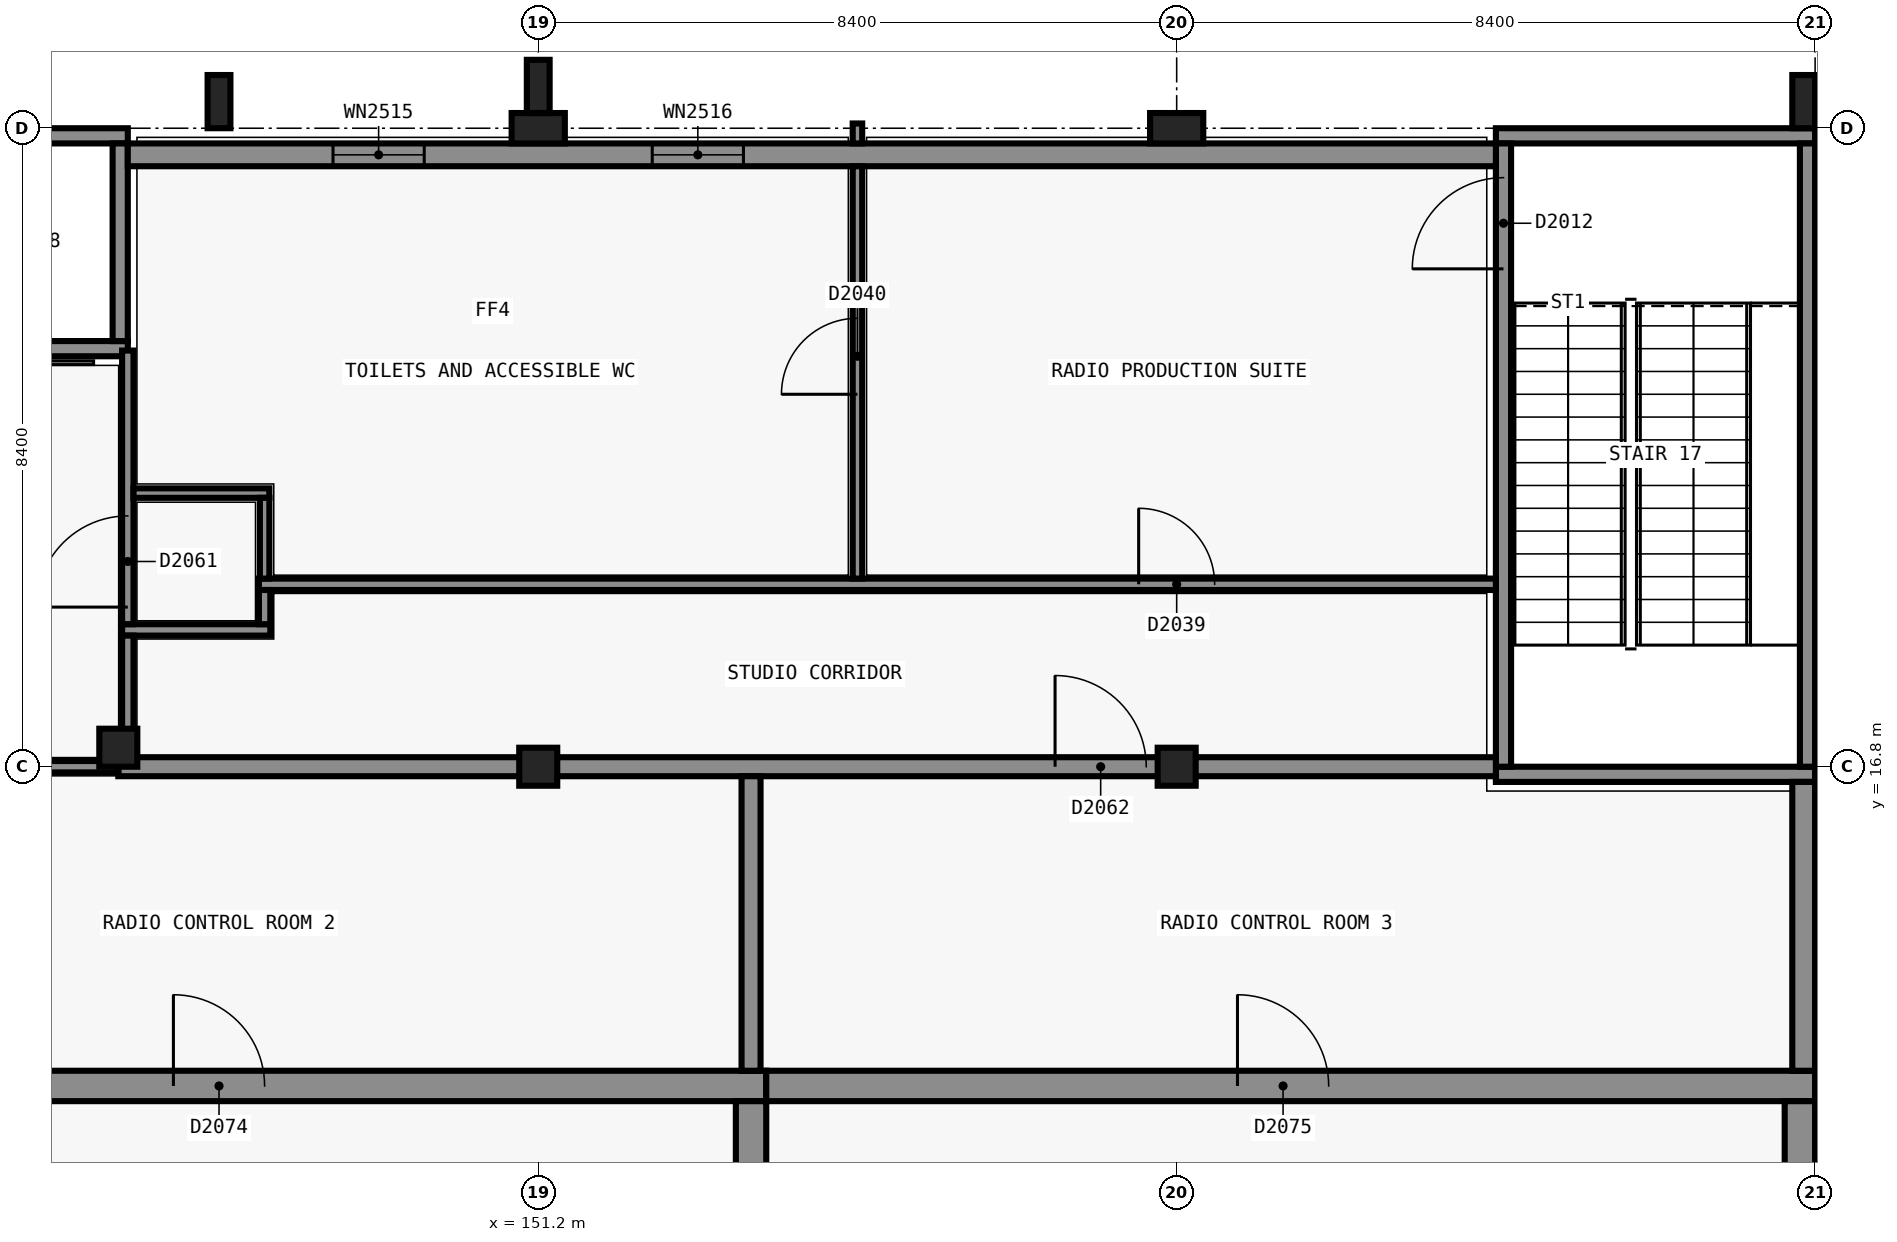
"""IFC4 building model, lengths in metres.
Left out: names, types, materials, properties, quantities, classifications, styles, units other than length and angle.
Written with IfcOpenShell. Run it as: python <this file> out.ifc"""

import sys

from ifc_helpers import new_model, si_unit, direction, frame, frame_2d, origin, origin_2d, place, context, subcontext, project, spatial, rectangle, extrude, element, fill, save


model = new_model("IFC4")
c1 = context("Model", 3, precision=1e-05, world=origin(), true_north=direction((0.0, 1.0)))
c2 = subcontext(c1, "Body", "Model", "MODEL_VIEW")
j1 = project(units=[si_unit("LENGTHUNIT", "METRE"), si_unit("PLANEANGLEUNIT", "RADIAN")], contexts=[c1])
p1 = place(None, origin())
s1 = spatial("IfcSite", under=j1, at=p1, CompositionType="ELEMENT")
p2 = place(p1, origin())
s2 = spatial("IfcBuilding", under=s1, at=p2, CompositionType="ELEMENT")
p3 = place(p2, frame((0.0, 0.0, 10.2)))
s3 = spatial("IfcBuildingStorey", under=s2, at=p3, CompositionType="ELEMENT", Elevation=10.2)
for number, where, z_axis, x_axis in (
    (1, (168.0, 16.7, 0.0), (0.0, 0.0, 1.0), (-1.0, 0.0, 0.0)),
    (2, (163.8, 25.1, 0.0), (0.0, 0.0, 1.0), (1.0, 0.0, 0.0)),
):
    element("IfcWall", number, at=place(p3, frame(where, z_axis=z_axis, x_axis=x_axis)), inside=s3, PredefinedType="SHEAR", context=c2, shape_type="SweptSolid", body=[
        extrude(rectangle(XDim=4.199, YDim=0.2, at=frame_2d((2.1, 0.0))), origin(), (0.0, 0.0, 1.0), 4.8),
    ])
p4 = place(p3, frame((163.9, 16.8, 0.0), z_axis=(0.0, 0.0, 1.0), x_axis=(0.0, 1.0, 0.0)))
e3 = element("IfcWall", 3, at=p4, inside=s3, PredefinedType="SHEAR", context=c2, shape_type="SweptSolid", body=[
    extrude(rectangle(XDim=8.2, YDim=0.2, at=frame_2d((4.1, 0.0))), origin(), (0.0, 0.0, 1.0), 4.8),
])
p5 = place(p4, frame((6.55, 0.0, 0.0)))
e4 = element("IfcOpeningElement", 4, at=p5, cuts=e3, PredefinedType="OPENING", context=c2, shape_type="SweptSolid", body=[
    extrude(rectangle(XDim=1.2, YDim=2.1, at=frame_2d((0.6, 1.05))), frame((0.0, 0.11, 0.0), z_axis=(0.0, -1.0, 0.0), x_axis=(1.0, 0.0, 0.0)), (0.0, 0.0, 1.0), 0.22),
])
p6 = place(p3, frame((167.9, 25.0, 0.0), z_axis=(0.0, 0.0, 1.0), x_axis=(0.0, -1.0, 0.0)))
e5 = element("IfcWall", 5, at=p6, inside=s3, PredefinedType="SHEAR", context=c2, shape_type="SweptSolid", body=[
    extrude(rectangle(XDim=8.2, YDim=0.2, at=frame_2d((4.1, 0.0))), origin(), (0.0, 0.0, 1.0), 4.8),
])
p7 = place(p3, frame((145.8, 22.3, 0.0), z_axis=(0.0, 0.0, 1.0), x_axis=(-1.0, 0.0, 0.0)))
e6 = element("IfcWall", 6, at=p7, inside=s3, PredefinedType="SHEAR", context=c2, shape_type="SweptSolid", body=[
    extrude(rectangle(XDim=4.2, YDim=0.2, at=frame_2d((2.1, 0.0))), origin(), (0.0, 0.0, 1.0), 4.8),
])
p8 = place(p7, frame((1.55, 0.0, 0.0)))
e7 = element("IfcOpeningElement", 7, at=p8, cuts=e6, PredefinedType="OPENING", context=c2, shape_type="SweptSolid", body=[
    extrude(rectangle(XDim=1.1, YDim=2.1, at=frame_2d((0.55, 1.05))), frame((0.0, 0.11, 0.0), z_axis=(0.0, -1.0, 0.0), x_axis=(1.0, 0.0, 0.0)), (0.0, 0.0, 1.0), 0.22),
])
p9 = place(p3, frame((141.6, 25.1, 0.0), z_axis=(0.0, 0.0, 1.0), x_axis=(1.0, 0.0, 0.0)))
e8 = element("IfcWall", 8, at=p9, inside=s3, PredefinedType="SHEAR", context=c2, shape_type="SweptSolid", body=[
    extrude(rectangle(XDim=4.2, YDim=0.2, at=frame_2d((2.1, 0.0))), origin(), (0.0, 0.0, 1.0), 4.8),
])
p10 = place(p3, frame((145.7, 25.0, 0.0), z_axis=(0.0, 0.0, 1.0), x_axis=(0.0, -1.0, 0.0)))
e9 = element("IfcWall", 9, at=p10, inside=s3, PredefinedType="SHEAR", context=c2, shape_type="SweptSolid", body=[
    extrude(rectangle(XDim=2.6, YDim=0.2, at=frame_2d((1.3, 0.0))), origin(), (0.0, 0.0, 1.0), 4.8),
])
p11 = place(p3, frame((140.2, 12.6, 0.0), z_axis=(0.0, 0.0, 1.0), x_axis=(1.0, 0.0, 0.0)))
e10 = element("IfcWall", 10, at=p11, inside=s3, PredefinedType="SHEAR", context=c2, shape_type="SweptSolid", body=[
    extrude(rectangle(XDim=14.0, YDim=0.4, at=frame_2d((7.0, 0.0))), origin(), (0.0, 0.0, 1.0), 4.8),
])
p12 = place(p11, frame((6.2, 0.0, 0.0)))
e11 = element("IfcOpeningElement", 11, at=p12, cuts=e10, PredefinedType="OPENING", context=c2, shape_type="SweptSolid", body=[
    extrude(rectangle(XDim=1.2, YDim=2.1, at=frame_2d((0.6, 1.05))), frame((0.0, 0.21, 0.0), z_axis=(0.0, -1.0, 0.0), x_axis=(1.0, 0.0, 0.0)), (0.0, 0.0, 1.0), 0.42),
])
p13 = place(p3, frame((154.0, 12.4, 0.0), z_axis=(0.0, 0.0, 1.0), x_axis=(0.0, -1.0, 0.0)))
e12 = element("IfcWall", 12, at=p13, inside=s3, PredefinedType="SHEAR", context=c2, shape_type="SweptSolid", body=[
    extrude(rectangle(XDim=12.0, YDim=0.4, at=frame_2d((6.0, 0.0))), origin(), (0.0, 0.0, 1.0), 4.8),
])
p14 = place(p3, frame((154.2, 12.6, 0.0), z_axis=(0.0, 0.0, 1.0), x_axis=(1.0, 0.0, 0.0)))
e13 = element("IfcWall", 13, at=p14, inside=s3, PredefinedType="SHEAR", context=c2, shape_type="SweptSolid", body=[
    extrude(rectangle(XDim=13.8, YDim=0.4, at=frame_2d((6.9, 0.0))), origin(), (0.0, 0.0, 1.0), 4.8),
])
p15 = place(p14, frame((6.2, 0.0, 0.0)))
e14 = element("IfcOpeningElement", 14, at=p15, cuts=e13, PredefinedType="OPENING", context=c2, shape_type="SweptSolid", body=[
    extrude(rectangle(XDim=1.2, YDim=2.1, at=frame_2d((0.6, 1.05))), frame((0.0, 0.21, 0.0), z_axis=(0.0, -1.0, 0.0), x_axis=(1.0, 0.0, 0.0)), (0.0, 0.0, 1.0), 0.42),
])
p16 = place(p3, frame((167.8, 12.4, 0.0), z_axis=(0.0, 0.0, 1.0), x_axis=(0.0, -1.0, 0.0)))
e15 = element("IfcWall", 15, at=p16, inside=s3, PredefinedType="SHEAR", context=c2, shape_type="SweptSolid", body=[
    extrude(rectangle(XDim=12.0, YDim=0.4, at=frame_2d((6.0, 0.0))), origin(), (0.0, 0.0, 1.0), 4.8),
])
p17 = place(p3, frame((167.85, 16.6, 0.0), z_axis=(0.0, 0.0, 1.0), x_axis=(0.0, -1.0, 0.0)))
e16 = element("IfcWall", 16, at=p17, inside=s3, PredefinedType="SOLIDWALL", context=c2, shape_type="SweptSolid", body=[
    extrude(rectangle(XDim=3.8, YDim=0.3, at=frame_2d((1.9, 0.0))), origin(), (0.0, 0.0, 1.0), 4.8),
])
p18 = place(p3, frame((151.2, 16.8, 0.0), z_axis=(0.0, 0.0, 1.0), x_axis=(1.0, 0.0, 0.0)))
e17 = element("IfcColumn", 17, at=p18, inside=s3, PredefinedType="COLUMN", context=c2, shape_type="SweptSolid", body=[
    extrude(rectangle(XDim=0.5, YDim=0.5, at=origin_2d()), origin(), (0.0, 0.0, 1.0), 4.8),
])
p19 = place(p3, frame((151.2, 25.2, 0.0), z_axis=(0.0, 0.0, 1.0), x_axis=(1.0, 0.0, 0.0)))
e18 = element("IfcColumn", 18, at=p19, inside=s3, PredefinedType="COLUMN", context=c2, shape_type="SweptSolid", body=[
    extrude(rectangle(XDim=0.7, YDim=0.4, at=origin_2d()), origin(), (0.0, 0.0, 1.0), 4.8),
])
p20 = place(p3, frame((159.6, 16.8, 0.0), z_axis=(0.0, 0.0, 1.0), x_axis=(1.0, 0.0, 0.0)))
e19 = element("IfcColumn", 19, at=p20, inside=s3, PredefinedType="COLUMN", context=c2, shape_type="SweptSolid", body=[
    extrude(rectangle(XDim=0.5, YDim=0.5, at=origin_2d()), origin(), (0.0, 0.0, 1.0), 4.8),
])
p21 = place(p3, frame((159.6, 25.2, 0.0), z_axis=(0.0, 0.0, 1.0), x_axis=(1.0, 0.0, 0.0)))
e20 = element("IfcColumn", 20, at=p21, inside=s3, PredefinedType="COLUMN", context=c2, shape_type="SweptSolid", body=[
    extrude(rectangle(XDim=0.7, YDim=0.4, at=origin_2d()), origin(), (0.0, 0.0, 1.0), 4.8),
])
p22 = place(p3, frame((145.675, 17.05, 0.0), z_axis=(0.0, 0.0, 1.0), x_axis=(1.0, 0.0, 0.0)))
e21 = element("IfcColumn", 21, at=p22, inside=s3, PredefinedType="COLUMN", context=c2, shape_type="SweptSolid", body=[
    extrude(rectangle(XDim=0.5, YDim=0.5, at=origin_2d()), origin(), (0.0, 0.0, 1.0), 4.8),
])
p23 = place(p3, frame((145.8, 24.85, 0.0), z_axis=(0.0, 0.0, 1.0), x_axis=(1.0, 0.0, 0.0)))
e22 = element("IfcWall", 22, at=p23, inside=s3, PredefinedType="SOLIDWALL", context=c2, shape_type="SweptSolid", body=[
    extrude(rectangle(XDim=18.0, YDim=0.3, at=frame_2d((9.0, 0.0))), origin(), (0.0, 0.0, 1.0), 4.5),
])
p24 = place(p23, frame((2.7, 0.0, 1.5)))
e23 = element("IfcOpeningElement", 23, at=p24, cuts=e22, PredefinedType="OPENING", context=c2, shape_type="SweptSolid", body=[
    extrude(rectangle(XDim=1.2, YDim=0.9, at=frame_2d((0.6, 0.45))), frame((0.0, 0.16, 0.0), z_axis=(0.0, -1.0, 0.0), x_axis=(1.0, 0.0, 0.0)), (0.0, 0.0, 1.0), 0.32),
])
p25 = place(p23, frame((6.9, 0.0, 1.5)))
e24 = element("IfcOpeningElement", 24, at=p25, cuts=e22, PredefinedType="OPENING", context=c2, shape_type="SweptSolid", body=[
    extrude(rectangle(XDim=1.2, YDim=0.9, at=frame_2d((0.6, 0.45))), frame((0.0, 0.16, 0.0), z_axis=(0.0, -1.0, 0.0), x_axis=(1.0, 0.0, 0.0)), (0.0, 0.0, 1.0), 0.32),
])
for number, where, z_axis, x_axis in (
    (25, (147.0, 25.55, 0.0), (0.0, 0.0, 1.0), (1.0, 0.0, 0.0)),
    (26, (151.2, 25.75, 0.0), (0.0, 0.0, 1.0), (1.0, 0.0, 0.0)),
    (27, (167.85, 25.55, 0.0), (0.0, 0.0, 1.0), (1.0, 0.0, 0.0)),
):
    element("IfcColumn", number, at=place(p3, frame(where, z_axis=z_axis, x_axis=x_axis)), inside=s3, PredefinedType="PILASTER", context=c2, shape_type="SweptSolid", body=[
        extrude(rectangle(XDim=0.3, YDim=0.7, at=origin_2d()), origin(), (0.0, 0.0, 1.0), 4.8),
    ])
p26 = place(p3, frame((145.675, 16.8, 0.0), z_axis=(0.0, 0.0, 1.0), x_axis=(1.0, 0.0, 0.0)))
e28 = element("IfcWall", 28, at=p26, inside=s3, PredefinedType="PARTITIONING", context=c2, shape_type="SweptSolid", body=[
    extrude(rectangle(XDim=18.125, YDim=0.25, at=frame_2d((9.062, 0.0))), origin(), (0.0, 0.0, 1.0), 3.8),
])
p27 = place(p26, frame((12.325, 0.0, 0.0)))
e29 = element("IfcOpeningElement", 29, at=p27, cuts=e28, PredefinedType="OPENING", context=c2, shape_type="SweptSolid", body=[
    extrude(rectangle(XDim=1.2, YDim=2.1, at=frame_2d((0.6, 1.05))), frame((0.0, 0.135, 0.0), z_axis=(0.0, -1.0, 0.0), x_axis=(1.0, 0.0, 0.0)), (0.0, 0.0, 1.0), 0.27),
])
p28 = place(p3, frame((154.0, 12.8, 0.0), z_axis=(0.0, 0.0, 1.0), x_axis=(0.0, 1.0, 0.0)))
e30 = element("IfcWall", 30, at=p28, inside=s3, PredefinedType="PARTITIONING", context=c2, shape_type="SweptSolid", body=[
    extrude(rectangle(XDim=3.875, YDim=0.25, at=frame_2d((1.938, 0.0))), origin(), (0.0, 0.0, 1.0), 3.8),
])
p29 = place(p3, frame((145.725, 18.6, 0.0), z_axis=(0.0, 0.0, 1.0), x_axis=(1.0, 0.0, 0.0)))
e31 = element("IfcWall", 31, at=p29, inside=s3, PredefinedType="PARTITIONING", context=c2, shape_type="SweptSolid", body=[
    extrude(rectangle(XDim=1.95, YDim=0.15, at=frame_2d((0.975, 0.0))), origin(), (0.0, 0.0, 1.0), 4.5),
])
p30 = place(p3, frame((147.525, 19.2, 0.0), z_axis=(0.0, 0.0, 1.0), x_axis=(1.0, 0.0, 0.0)))
e32 = element("IfcWall", 32, at=p30, inside=s3, PredefinedType="PARTITIONING", context=c2, shape_type="SweptSolid", body=[
    extrude(rectangle(XDim=16.275, YDim=0.15, at=frame_2d((8.137, 0.0))), origin(), (0.0, 0.0, 1.0), 3.8),
])
p31 = place(p30, frame((11.575, 0.0, 0.0)))
e33 = element("IfcOpeningElement", 33, at=p31, cuts=e32, PredefinedType="OPENING", context=c2, shape_type="SweptSolid", body=[
    extrude(rectangle(XDim=1.0, YDim=2.1, at=frame_2d((0.5, 1.05))), frame((0.0, 0.085, 0.0), z_axis=(0.0, -1.0, 0.0), x_axis=(1.0, 0.0, 0.0)), (0.0, 0.0, 1.0), 0.17),
])
p32 = place(p3, frame((140.125, 16.8, 0.0), z_axis=(0.0, 0.0, 1.0), x_axis=(1.0, 0.0, 0.0)))
e34 = element("IfcWall", 34, at=p32, inside=s3, PredefinedType="SOLIDWALL", context=c2, shape_type="SweptSolid", body=[
    extrude(rectangle(XDim=5.55, YDim=0.15, at=frame_2d((2.775, 0.0))), origin(), (0.0, 0.0, 1.0), 3.8),
])
p33 = place(p32, frame((3.075, 0.0, 0.0)))
e35 = element("IfcOpeningElement", 35, at=p33, cuts=e34, PredefinedType="OPENING", context=c2, shape_type="SweptSolid", body=[
    extrude(rectangle(XDim=1.2, YDim=2.1, at=frame_2d((0.6, 1.05))), frame((0.0, 0.085, 0.0), z_axis=(0.0, -1.0, 0.0), x_axis=(1.0, 0.0, 0.0)), (0.0, 0.0, 1.0), 0.17),
])
p34 = place(p3, frame((147.6, 18.675, 0.0), z_axis=(0.0, 0.0, 1.0), x_axis=(0.0, 1.0, 0.0)))
e36 = element("IfcWall", 36, at=p34, inside=s3, PredefinedType="PARTITIONING", context=c2, shape_type="SweptSolid", body=[
    extrude(rectangle(XDim=0.45, YDim=0.15, at=frame_2d((0.225, 0.0))), origin(), (0.0, 0.0, 1.0), 4.5),
])
p35 = place(p3, frame((145.8, 16.925, 0.0), z_axis=(0.0, 0.0, 1.0), x_axis=(0.0, 1.0, 0.0)))
e37 = element("IfcWall", 37, at=p35, inside=s3, PredefinedType="SOLIDWALL", context=c2, shape_type="SweptSolid", body=[
    extrude(rectangle(XDim=1.6, YDim=0.15, at=frame_2d((0.8, 0.0))), origin(), (0.0, 0.0, 1.0), 3.8),
])
p36 = place(p3, frame((145.8, 18.675, 0.0), z_axis=(0.0, 0.0, 1.0), x_axis=(0.0, 1.0, 0.0)))
e38 = element("IfcWall", 38, at=p36, inside=s3, PredefinedType="SOLIDWALL", context=c2, shape_type="SweptSolid", body=[
    extrude(rectangle(XDim=3.6, YDim=0.15, at=frame_2d((1.8, 0.0))), origin(), (0.0, 0.0, 1.0), 4.5),
])
p37 = place(p36, frame((0.225, 0.0, 0.0)))
e39 = element("IfcOpeningElement", 39, at=p37, cuts=e38, PredefinedType="OPENING", context=c2, shape_type="SweptSolid", body=[
    extrude(rectangle(XDim=1.2, YDim=2.1, at=frame_2d((0.6, 1.05))), frame((0.0, 0.085, 0.0), z_axis=(0.0, -1.0, 0.0), x_axis=(1.0, 0.0, 0.0)), (0.0, 0.0, 1.0), 0.17),
])
p38 = place(p3, frame((145.875, 20.4, 0.0), z_axis=(0.0, 0.0, 1.0), x_axis=(1.0, 0.0, 0.0)))
e40 = element("IfcWall", 40, at=p38, inside=s3, PredefinedType="PARTITIONING", context=c2, shape_type="SweptSolid", body=[
    extrude(rectangle(XDim=1.788, YDim=0.125, at=frame_2d((0.894, 0.0))), origin(), (0.0, 0.0, 1.0), 4.5),
])
p39 = place(p3, frame((147.6, 19.275, 0.0), z_axis=(0.0, 0.0, 1.0), x_axis=(0.0, 1.0, 0.0)))
e41 = element("IfcWall", 41, at=p39, inside=s3, PredefinedType="PARTITIONING", context=c2, shape_type="SweptSolid", body=[
    extrude(rectangle(XDim=1.062, YDim=0.125, at=frame_2d((0.531, 0.0))), origin(), (0.0, 0.0, 1.0), 4.5),
])
p40 = place(p3, frame((155.4, 19.275, 0.0), z_axis=(0.0, 0.0, 1.0), x_axis=(0.0, 1.0, 0.0)))
e42 = element("IfcWall", 42, at=p40, inside=s3, PredefinedType="PARTITIONING", context=c2, shape_type="SweptSolid", body=[
    extrude(rectangle(XDim=5.425, YDim=0.125, at=frame_2d((2.712, 0.0))), origin(), (0.0, 0.0, 1.0), 3.8),
])
p41 = place(p40, frame((2.425, 0.0, 0.0)))
e43 = element("IfcOpeningElement", 43, at=p41, cuts=e42, PredefinedType="OPENING", context=c2, shape_type="SweptSolid", body=[
    extrude(rectangle(XDim=1.0, YDim=2.1, at=frame_2d((0.5, 1.05))), frame((0.0, 0.073, 0.0), z_axis=(0.0, -1.0, 0.0), x_axis=(1.0, 0.0, 0.0)), (0.0, 0.0, 1.0), 0.145),
])
p42 = place(p3, frame((155.4, 25.0, 0.0), z_axis=(0.0, 0.0, 1.0), x_axis=(0.0, 1.0, 0.0)))
e44 = element("IfcWall", 44, at=p42, inside=s3, PredefinedType="PARTITIONING", context=c2, shape_type="SweptSolid", body=[
    extrude(rectangle(XDim=0.262, YDim=0.125, at=frame_2d((0.131, 0.0))), origin(), (0.0, 0.0, 1.0), 3.8),
])
p43 = place(p24, origin())
e45 = element("IfcWindow", 45, at=p43, inside=s3, PartitioningType="SINGLE_PANEL", PredefinedType="WINDOW", context=c2, shape_type="SweptSolid", body=[
    extrude(rectangle(XDim=1.2, YDim=0.9, at=frame_2d((0.6, 0.45))), frame((0.0, 0.03, 0.0), z_axis=(0.0, -1.0, 0.0), x_axis=(1.0, 0.0, 0.0)), (0.0, 0.0, 1.0), 0.06),
])
fill(e23, e45)
p44 = place(p25, origin())
e46 = element("IfcWindow", 46, at=p44, inside=s3, PartitioningType="SINGLE_PANEL", PredefinedType="WINDOW", context=c2, shape_type="SweptSolid", body=[
    extrude(rectangle(XDim=1.2, YDim=0.9, at=frame_2d((0.6, 0.45))), frame((0.0, 0.03, 0.0), z_axis=(0.0, -1.0, 0.0), x_axis=(1.0, 0.0, 0.0)), (0.0, 0.0, 1.0), 0.06),
])
fill(e24, e46)
p45 = place(p5, origin())
e47 = element("IfcDoor", 47, at=p45, inside=s3, OperationType="SINGLE_SWING_RIGHT", PredefinedType="DOOR", context=c2, shape_type="SweptSolid", body=[
    extrude(rectangle(XDim=1.2, YDim=2.1, at=frame_2d((0.6, 1.05))), frame((0.0, 0.025, 0.0), z_axis=(0.0, -1.0, 0.0), x_axis=(1.0, 0.0, 0.0)), (0.0, 0.0, 1.0), 0.05),
])
fill(e4, e47)
p46 = place(p31, origin())
e48 = element("IfcDoor", 48, at=p46, inside=s3, OperationType="SINGLE_SWING_RIGHT", PredefinedType="DOOR", context=c2, shape_type="SweptSolid", body=[
    extrude(rectangle(XDim=1.0, YDim=2.1, at=frame_2d((0.5, 1.05))), frame((0.0, 0.025, 0.0), z_axis=(0.0, -1.0, 0.0), x_axis=(1.0, 0.0, 0.0)), (0.0, 0.0, 1.0), 0.05),
])
fill(e33, e48)
p47 = place(p41, origin())
e49 = element("IfcDoor", 49, at=p47, inside=s3, OperationType="SINGLE_SWING_RIGHT", PredefinedType="DOOR", context=c2, shape_type="SweptSolid", body=[
    extrude(rectangle(XDim=1.0, YDim=2.1, at=frame_2d((0.5, 1.05))), frame((0.0, 0.025, 0.0), z_axis=(0.0, -1.0, 0.0), x_axis=(1.0, 0.0, 0.0)), (0.0, 0.0, 1.0), 0.05),
])
fill(e43, e49)
p48 = place(p37, origin())
e50 = element("IfcDoor", 50, at=p48, inside=s3, OperationType="SINGLE_SWING_RIGHT", PredefinedType="DOOR", context=c2, shape_type="SweptSolid", body=[
    extrude(rectangle(XDim=1.2, YDim=2.1, at=frame_2d((0.6, 1.05))), frame((0.0, 0.025, 0.0), z_axis=(0.0, -1.0, 0.0), x_axis=(1.0, 0.0, 0.0)), (0.0, 0.0, 1.0), 0.05),
])
fill(e39, e50)
p49 = place(p27, origin())
e51 = element("IfcDoor", 51, at=p49, inside=s3, OperationType="SINGLE_SWING_LEFT", PredefinedType="DOOR", context=c2, shape_type="SweptSolid", body=[
    extrude(rectangle(XDim=1.2, YDim=2.1, at=frame_2d((0.6, 1.05))), frame((0.0, 0.025, 0.0), z_axis=(0.0, -1.0, 0.0), x_axis=(1.0, 0.0, 0.0)), (0.0, 0.0, 1.0), 0.05),
])
fill(e29, e51)
p50 = place(p12, origin())
e52 = element("IfcDoor", 52, at=p50, inside=s3, OperationType="SINGLE_SWING_RIGHT", PredefinedType="DOOR", context=c2, shape_type="SweptSolid", body=[
    extrude(rectangle(XDim=1.2, YDim=2.1, at=frame_2d((0.6, 1.05))), frame((0.0, 0.025, 0.0), z_axis=(0.0, -1.0, 0.0), x_axis=(1.0, 0.0, 0.0)), (0.0, 0.0, 1.0), 0.05),
])
fill(e11, e52)
p51 = place(p15, origin())
e53 = element("IfcDoor", 53, at=p51, inside=s3, OperationType="SINGLE_SWING_RIGHT", PredefinedType="DOOR", context=c2, shape_type="SweptSolid", body=[
    extrude(rectangle(XDim=1.2, YDim=2.1, at=frame_2d((0.6, 1.05))), frame((0.0, 0.025, 0.0), z_axis=(0.0, -1.0, 0.0), x_axis=(1.0, 0.0, 0.0)), (0.0, 0.0, 1.0), 0.05),
])
fill(e14, e53)
save(model, sys.argv[1])
